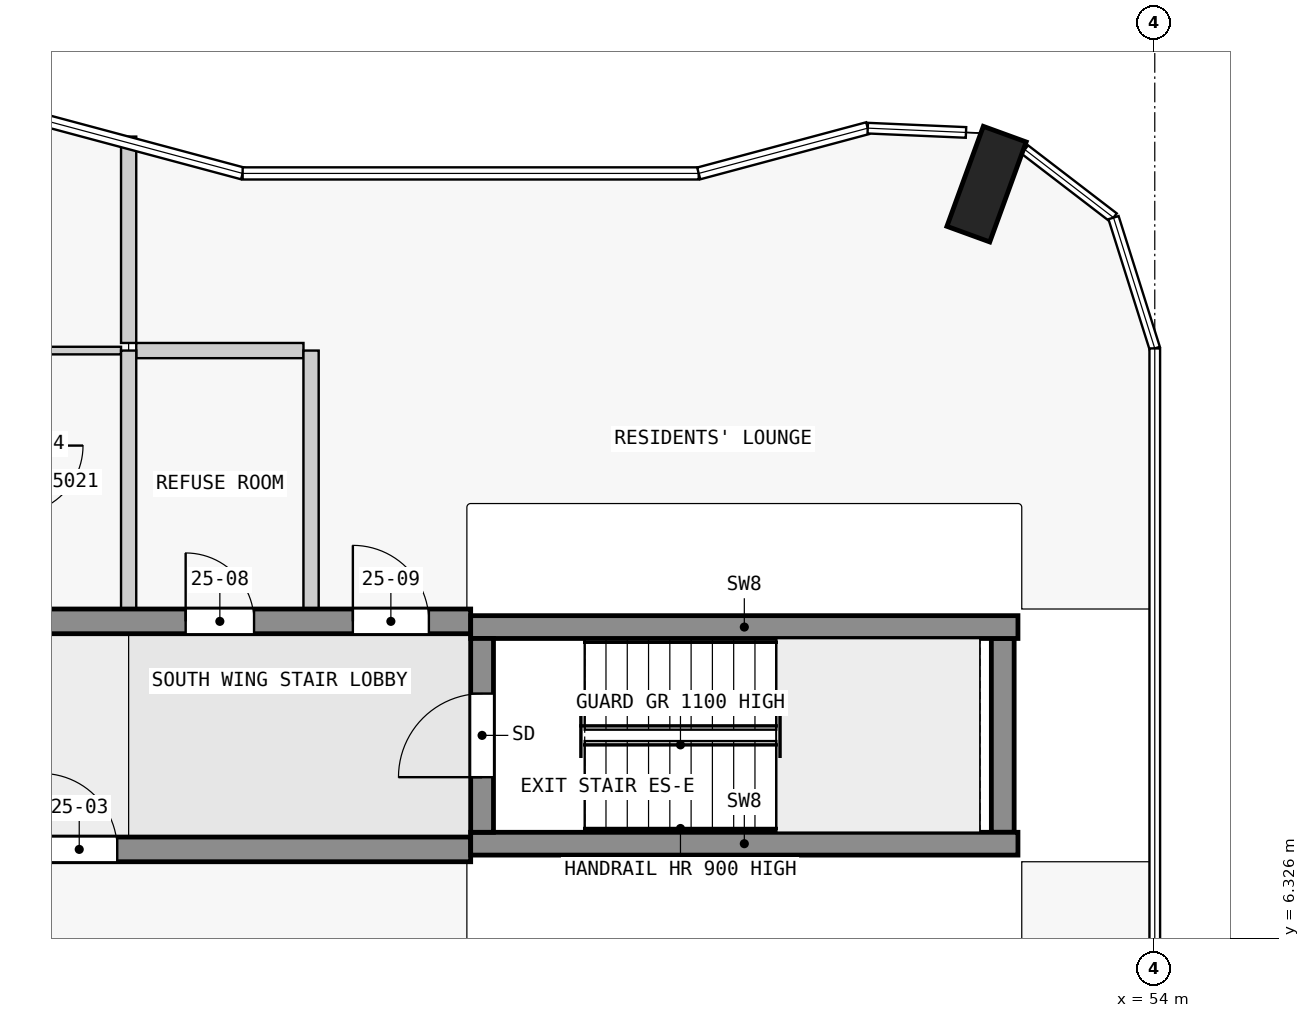
"""IFC4 building model, lengths in metres.
Left out: names, types, materials, properties, quantities, classifications, styles, units other than length and angle.
Written with IfcOpenShell. Run it as: python <this file> out.ifc"""

import sys

from ifc_helpers import new_model, si_unit, direction, frame, frame_2d, origin, origin_2d, place, context, subcontext, project, spatial, rectangle, extrude, element, fill, save


model = new_model("IFC4")
c1 = context("Model", 3, precision=1e-05, world=origin(), true_north=direction((0.0, 1.0)))
c2 = subcontext(c1, "Body", "Model", "MODEL_VIEW")
j1 = project(units=[si_unit("LENGTHUNIT", "METRE"), si_unit("PLANEANGLEUNIT", "RADIAN")], contexts=[c1])
p1 = place(None, origin())
s1 = spatial("IfcSite", under=j1, at=p1, CompositionType="ELEMENT")
p2 = place(p1, origin())
s2 = spatial("IfcBuilding", under=s1, at=p2, CompositionType="ELEMENT")
p3 = place(p2, frame((0.0, 0.0, 99.3)))
s3 = spatial("IfcBuildingStorey", under=s2, at=p3, CompositionType="ELEMENT", Elevation=99.3)
p4 = place(p3, frame((51.787, 16.252, 0.0), z_axis=(0.0, 0.0, 1.0), x_axis=(-0.939664280925, 0.342097996418, 0.0)))
e1 = element("IfcColumn", 1, at=p4, inside=s3, PredefinedType="COLUMN", context=c2, shape_type="SweptSolid", body=[
    extrude(rectangle(XDim=0.6, YDim=1.4, at=origin_2d()), origin(), (0.0, 0.0, 1.0), 3.5),
])
p5 = place(p3, frame((45.15, 7.725, 0.0), z_axis=(0.0, 0.0, 1.0), x_axis=(0.0, 1.0, 0.0)))
e2 = element("IfcWall", 2, at=p5, inside=s3, PredefinedType="SHEAR", context=c2, shape_type="SweptSolid", body=[
    extrude(rectangle(XDim=2.55, YDim=0.3, at=frame_2d((1.275, 0.0))), origin(), (0.0, 0.0, 1.0), 3.5),
])
p6 = place(p5, frame((0.725, 0.0, 0.0)))
e3 = element("IfcOpeningElement", 3, at=p6, cuts=e2, PredefinedType="OPENING", context=c2, shape_type="SweptSolid", body=[
    extrude(rectangle(XDim=1.1, YDim=2.1, at=frame_2d((0.55, 1.05))), frame((0.0, 0.16, 0.0), z_axis=(0.0, -1.0, 0.0), x_axis=(1.0, 0.0, 0.0)), (0.0, 0.0, 1.0), 0.32),
])
p7 = place(p3, frame((52.0, 7.725, 0.0), z_axis=(0.0, 0.0, 1.0), x_axis=(0.0, 1.0, 0.0)))
e4 = element("IfcWall", 4, at=p7, inside=s3, PredefinedType="SHEAR", context=c2, shape_type="SweptSolid", body=[
    extrude(rectangle(XDim=2.55, YDim=0.3, at=frame_2d((1.275, 0.0))), origin(), (0.0, 0.0, 1.0), 3.5),
])
for number, where, z_axis, x_axis in (
    (5, (45.0, 7.575, 0.0), (0.0, 0.0, 1.0), (1.0, 0.0, 0.0)),
    (6, (45.0, 10.425, 0.0), (0.0, 0.0, 1.0), (1.0, 0.0, 0.0)),
):
    element("IfcWall", number, at=place(p3, frame(where, z_axis=z_axis, x_axis=x_axis)), inside=s3, PredefinedType="SHEAR", context=c2, shape_type="SweptSolid", body=[
        extrude(rectangle(XDim=7.2, YDim=0.3, at=frame_2d((3.6, 0.0))), origin(), (0.0, 0.0, 1.0), 3.5),
    ])
p8 = place(p3, frame((22.5, 7.5, 0.0), z_axis=(0.0, 0.0, 1.0), x_axis=(1.0, 0.0, 0.0)))
e7 = element("IfcWall", 7, at=p8, inside=s3, PredefinedType="SHEAR", context=c2, shape_type="SweptSolid", body=[
    extrude(rectangle(XDim=22.5, YDim=0.325, at=frame_2d((11.25, 0.0))), origin(), (0.0, 0.0, 1.0), 3.25),
])
p9 = place(p8, frame((4.05, 0.0, 0.0)))
e8 = element("IfcOpeningElement", 8, at=p9, cuts=e7, PredefinedType="OPENING", context=c2, shape_type="SweptSolid", body=[
    extrude(rectangle(XDim=1.0, YDim=2.1, at=frame_2d((0.5, 1.05))), frame((0.0, 0.172, 0.0), z_axis=(0.0, -1.0, 0.0), x_axis=(1.0, 0.0, 0.0)), (0.0, 0.0, 1.0), 0.345),
])
p10 = place(p8, frame((10.75, 0.0, 0.0)))
e9 = element("IfcOpeningElement", 9, at=p10, cuts=e7, PredefinedType="OPENING", context=c2, shape_type="SweptSolid", body=[
    extrude(rectangle(XDim=1.0, YDim=2.1, at=frame_2d((0.5, 1.05))), frame((0.0, 0.172, 0.0), z_axis=(0.0, -1.0, 0.0), x_axis=(1.0, 0.0, 0.0)), (0.0, 0.0, 1.0), 0.345),
])
p11 = place(p8, frame((16.85, 0.0, 0.0)))
e10 = element("IfcOpeningElement", 10, at=p11, cuts=e7, PredefinedType="OPENING", context=c2, shape_type="SweptSolid", body=[
    extrude(rectangle(XDim=1.0, YDim=2.1, at=frame_2d((0.5, 1.05))), frame((0.0, 0.172, 0.0), z_axis=(0.0, -1.0, 0.0), x_axis=(1.0, 0.0, 0.0)), (0.0, 0.0, 1.0), 0.345),
])
p12 = place(p3, frame((22.5, 10.5, 0.0), z_axis=(0.0, 0.0, 1.0), x_axis=(1.0, 0.0, 0.0)))
e11 = element("IfcWall", 11, at=p12, inside=s3, PredefinedType="SHEAR", context=c2, shape_type="SweptSolid", body=[
    extrude(rectangle(XDim=22.5, YDim=0.325, at=frame_2d((11.25, 0.0))), origin(), (0.0, 0.0, 1.0), 3.25),
])
p13 = place(p12, frame((1.75, 0.0, 0.0)))
e12 = element("IfcOpeningElement", 12, at=p13, cuts=e11, PredefinedType="OPENING", context=c2, shape_type="SweptSolid", body=[
    extrude(rectangle(XDim=1.0, YDim=2.1, at=frame_2d((0.5, 1.05))), frame((0.0, 0.172, 0.0), z_axis=(0.0, -1.0, 0.0), x_axis=(1.0, 0.0, 0.0)), (0.0, 0.0, 1.0), 0.345),
])
p14 = place(p12, frame((6.25, 0.0, 0.0)))
e13 = element("IfcOpeningElement", 13, at=p14, cuts=e11, PredefinedType="OPENING", context=c2, shape_type="SweptSolid", body=[
    extrude(rectangle(XDim=1.0, YDim=2.1, at=frame_2d((0.5, 1.05))), frame((0.0, 0.172, 0.0), z_axis=(0.0, -1.0, 0.0), x_axis=(1.0, 0.0, 0.0)), (0.0, 0.0, 1.0), 0.345),
])
p15 = place(p12, frame((10.85, 0.0, 0.0)))
e14 = element("IfcOpeningElement", 14, at=p15, cuts=e11, PredefinedType="OPENING", context=c2, shape_type="SweptSolid", body=[
    extrude(rectangle(XDim=0.9, YDim=2.1, at=frame_2d((0.45, 1.05))), frame((0.0, 0.172, 0.0), z_axis=(0.0, -1.0, 0.0), x_axis=(1.0, 0.0, 0.0)), (0.0, 0.0, 1.0), 0.345),
])
p16 = place(p12, frame((15.25, 0.0, 0.0)))
e15 = element("IfcOpeningElement", 15, at=p16, cuts=e11, PredefinedType="OPENING", context=c2, shape_type="SweptSolid", body=[
    extrude(rectangle(XDim=1.0, YDim=2.1, at=frame_2d((0.5, 1.05))), frame((0.0, 0.172, 0.0), z_axis=(0.0, -1.0, 0.0), x_axis=(1.0, 0.0, 0.0)), (0.0, 0.0, 1.0), 0.345),
])
p17 = place(p12, frame((18.75, 0.0, 0.0)))
e16 = element("IfcOpeningElement", 16, at=p17, cuts=e11, PredefinedType="OPENING", context=c2, shape_type="SweptSolid", body=[
    extrude(rectangle(XDim=0.9, YDim=2.1, at=frame_2d((0.45, 1.05))), frame((0.0, 0.172, 0.0), z_axis=(0.0, -1.0, 0.0), x_axis=(1.0, 0.0, 0.0)), (0.0, 0.0, 1.0), 0.345),
])
p18 = place(p12, frame((20.95, 0.0, 0.0)))
e17 = element("IfcOpeningElement", 17, at=p18, cuts=e11, PredefinedType="OPENING", context=c2, shape_type="SweptSolid", body=[
    extrude(rectangle(XDim=1.0, YDim=2.1, at=frame_2d((0.5, 1.05))), frame((0.0, 0.172, 0.0), z_axis=(0.0, -1.0, 0.0), x_axis=(1.0, 0.0, 0.0)), (0.0, 0.0, 1.0), 0.345),
])
p19 = place(p3, frame((40.4, 14.062, 0.0), z_axis=(0.0, 0.0, 1.0), x_axis=(-1.0, 0.0, 0.0)))
e18 = element("IfcWall", 18, at=p19, inside=s3, PredefinedType="PARTITIONING", context=c2, shape_type="SweptSolid", body=[
    extrude(rectangle(XDim=1.35, YDim=0.1, at=frame_2d((0.675, 0.0))), origin(), (0.0, 0.0, 1.0), 3.25),
])
p20 = place(p3, frame((42.8, 14.062, 0.0), z_axis=(0.0, 0.0, 1.0), x_axis=(-1.0, 0.0, 0.0)))
e19 = element("IfcWall", 19, at=p20, inside=s3, PredefinedType="PARTITIONING", context=c2, shape_type="SweptSolid", body=[
    extrude(rectangle(XDim=2.2, YDim=0.2, at=frame_2d((1.1, 0.0))), origin(), (0.0, 0.0, 1.0), 3.25),
])
p21 = place(p3, frame((40.5, 16.878, 0.0), z_axis=(0.0, 0.0, 1.0), x_axis=(0.0, -1.0, 0.0)))
e20 = element("IfcWall", 20, at=p21, inside=s3, PredefinedType="PARTITIONING", context=c2, shape_type="SweptSolid", body=[
    extrude(rectangle(XDim=2.715, YDim=0.2, at=frame_2d((1.357, 0.0))), origin(), (0.0, 0.0, 1.0), 3.25),
])
for number, where, z_axis, x_axis in (
    (21, (40.5, 10.663, 0.0), (0.0, 0.0, 1.0), (0.0, 1.0, 0.0)),
    (22, (42.9, 10.663, 0.0), (0.0, 0.0, 1.0), (0.0, 1.0, 0.0)),
):
    element("IfcWall", number, at=place(p3, frame(where, z_axis=z_axis, x_axis=x_axis)), inside=s3, PredefinedType="PARTITIONING", context=c2, shape_type="SweptSolid", body=[
        extrude(rectangle(XDim=3.4, YDim=0.2, at=frame_2d((1.7, 0.0))), origin(), (0.0, 0.0, 1.0), 3.25),
    ])
p22 = place(p6, origin())
e23 = element("IfcDoor", 23, at=p22, inside=s3, OperationType="SINGLE_SWING_LEFT", PredefinedType="DOOR", context=c2, shape_type="SweptSolid", body=[
    extrude(rectangle(XDim=1.1, YDim=2.1, at=frame_2d((0.55, 1.05))), frame((0.0, 0.025, 0.0), z_axis=(0.0, -1.0, 0.0), x_axis=(1.0, 0.0, 0.0)), (0.0, 0.0, 1.0), 0.05),
])
fill(e3, e23)
p23 = place(p11, origin())
e24 = element("IfcDoor", 24, at=p23, inside=s3, OperationType="SINGLE_SWING_RIGHT", PredefinedType="DOOR", context=c2, shape_type="SweptSolid", body=[
    extrude(rectangle(XDim=1.0, YDim=2.1, at=frame_2d((0.5, 1.05))), frame((0.0, 0.025, 0.0), z_axis=(0.0, -1.0, 0.0), x_axis=(1.0, 0.0, 0.0)), (0.0, 0.0, 1.0), 0.05),
])
fill(e10, e24)
p24 = place(p17, origin())
e25 = element("IfcDoor", 25, at=p24, inside=s3, OperationType="SINGLE_SWING_RIGHT", PredefinedType="DOOR", context=c2, shape_type="SweptSolid", body=[
    extrude(rectangle(XDim=0.9, YDim=2.1, at=frame_2d((0.45, 1.05))), frame((0.0, 0.025, 0.0), z_axis=(0.0, -1.0, 0.0), x_axis=(1.0, 0.0, 0.0)), (0.0, 0.0, 1.0), 0.05),
])
fill(e16, e25)
p25 = place(p18, origin())
e26 = element("IfcDoor", 26, at=p25, inside=s3, OperationType="SINGLE_SWING_RIGHT", PredefinedType="DOOR", context=c2, shape_type="SweptSolid", body=[
    extrude(rectangle(XDim=1.0, YDim=2.1, at=frame_2d((0.5, 1.05))), frame((0.0, 0.025, 0.0), z_axis=(0.0, -1.0, 0.0), x_axis=(1.0, 0.0, 0.0)), (0.0, 0.0, 1.0), 0.05),
])
fill(e17, e26)
save(model, sys.argv[1])
